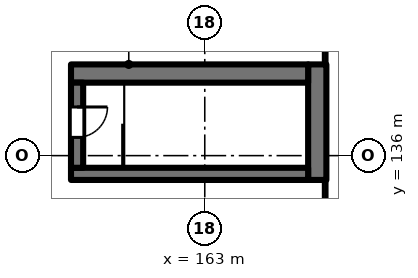
"""IFC4 building model, lengths in metres.
Left out: names, types, materials, properties, quantities, classifications, styles, units other than length and angle.
Written with IfcOpenShell. Run it as: python <this file> out.ifc"""

import sys

from ifc_helpers import new_model, si_unit, direction, frame, frame_2d, origin, place, context, subcontext, project, spatial, rectangle, extrude, element, fill, save


model = new_model("IFC4")
c1 = context("Model", 3, precision=1e-05, world=origin(), true_north=direction((0.0, 1.0)))
c2 = subcontext(c1, "Body", "Model", "MODEL_VIEW")
j1 = project(units=[si_unit("LENGTHUNIT", "METRE"), si_unit("PLANEANGLEUNIT", "RADIAN")], contexts=[c1])
p1 = place(None, origin())
s1 = spatial("IfcSite", under=j1, at=p1, CompositionType="ELEMENT")
p2 = place(p1, origin())
s2 = spatial("IfcBuilding", under=s1, at=p2, CompositionType="ELEMENT")
p3 = place(p2, frame((0.0, 0.0, 89.0)))
s3 = spatial("IfcBuildingStorey", under=s2, at=p3, CompositionType="ELEMENT", Elevation=89.0)
p4 = place(p3, frame((166.7, 139.0, 0.0), z_axis=(0.0, 0.0, 1.0), x_axis=(0.0, -1.0, 0.0)))
e1 = element("IfcWall", 1, at=p4, inside=s3, PredefinedType="SHEAR", context=c2, shape_type="SweptSolid", body=[
    extrude(rectangle(XDim=3.8, YDim=0.6, at=frame_2d((1.9, 0.0))), origin(), (0.0, 0.0, 1.0), 4.0),
])
p5 = place(p3, frame((166.4, 138.7, 0.0), z_axis=(0.0, 0.0, 1.0), x_axis=(-1.0, 0.0, 0.0)))
e2 = element("IfcWall", 2, at=p5, inside=s3, PredefinedType="SHEAR", context=c2, shape_type="SweptSolid", body=[
    extrude(rectangle(XDim=7.8, YDim=0.6, at=frame_2d((3.9, 0.0))), origin(), (0.0, 0.0, 1.0), 4.0),
])
p6 = place(p3, frame((166.4, 135.4, 0.0), z_axis=(0.0, 0.0, 1.0), x_axis=(-1.0, 0.0, 0.0)))
e3 = element("IfcWall", 3, at=p6, inside=s3, PredefinedType="SHEAR", context=c2, shape_type="SweptSolid", body=[
    extrude(rectangle(XDim=7.8, YDim=0.4, at=frame_2d((3.9, 0.0))), origin(), (0.0, 0.0, 1.0), 4.0),
])
p7 = place(p3, frame((158.8, 138.4, 0.0), z_axis=(0.0, 0.0, 1.0), x_axis=(0.0, -1.0, 0.0)))
e4 = element("IfcWall", 4, at=p7, inside=s3, PredefinedType="SHEAR", context=c2, shape_type="SweptSolid", body=[
    extrude(rectangle(XDim=2.8, YDim=0.4, at=frame_2d((1.4, 0.0))), origin(), (0.0, 0.0, 1.0), 4.0),
])
p8 = place(p7, frame((0.8, 0.0, 0.0)))
e5 = element("IfcOpeningElement", 5, at=p8, cuts=e4, PredefinedType="OPENING", context=c2, shape_type="SweptSolid", body=[
    extrude(rectangle(XDim=1.0, YDim=2.1, at=frame_2d((0.5, 1.05))), frame((0.0, 0.21, 0.0), z_axis=(0.0, -1.0, 0.0), x_axis=(1.0, 0.0, 0.0)), (0.0, 0.0, 1.0), 0.42),
])
p9 = place(p8, origin())
e6 = element("IfcDoor", 6, at=p9, inside=s3, OperationType="SINGLE_SWING_LEFT", PredefinedType="DOOR", context=c2, shape_type="SweptSolid", body=[
    extrude(rectangle(XDim=1.0, YDim=2.1, at=frame_2d((0.5, 1.05))), frame((0.0, 0.025, 0.0), z_axis=(0.0, -1.0, 0.0), x_axis=(1.0, 0.0, 0.0)), (0.0, 0.0, 1.0), 0.05),
])
fill(e5, e6)
save(model, sys.argv[1])
